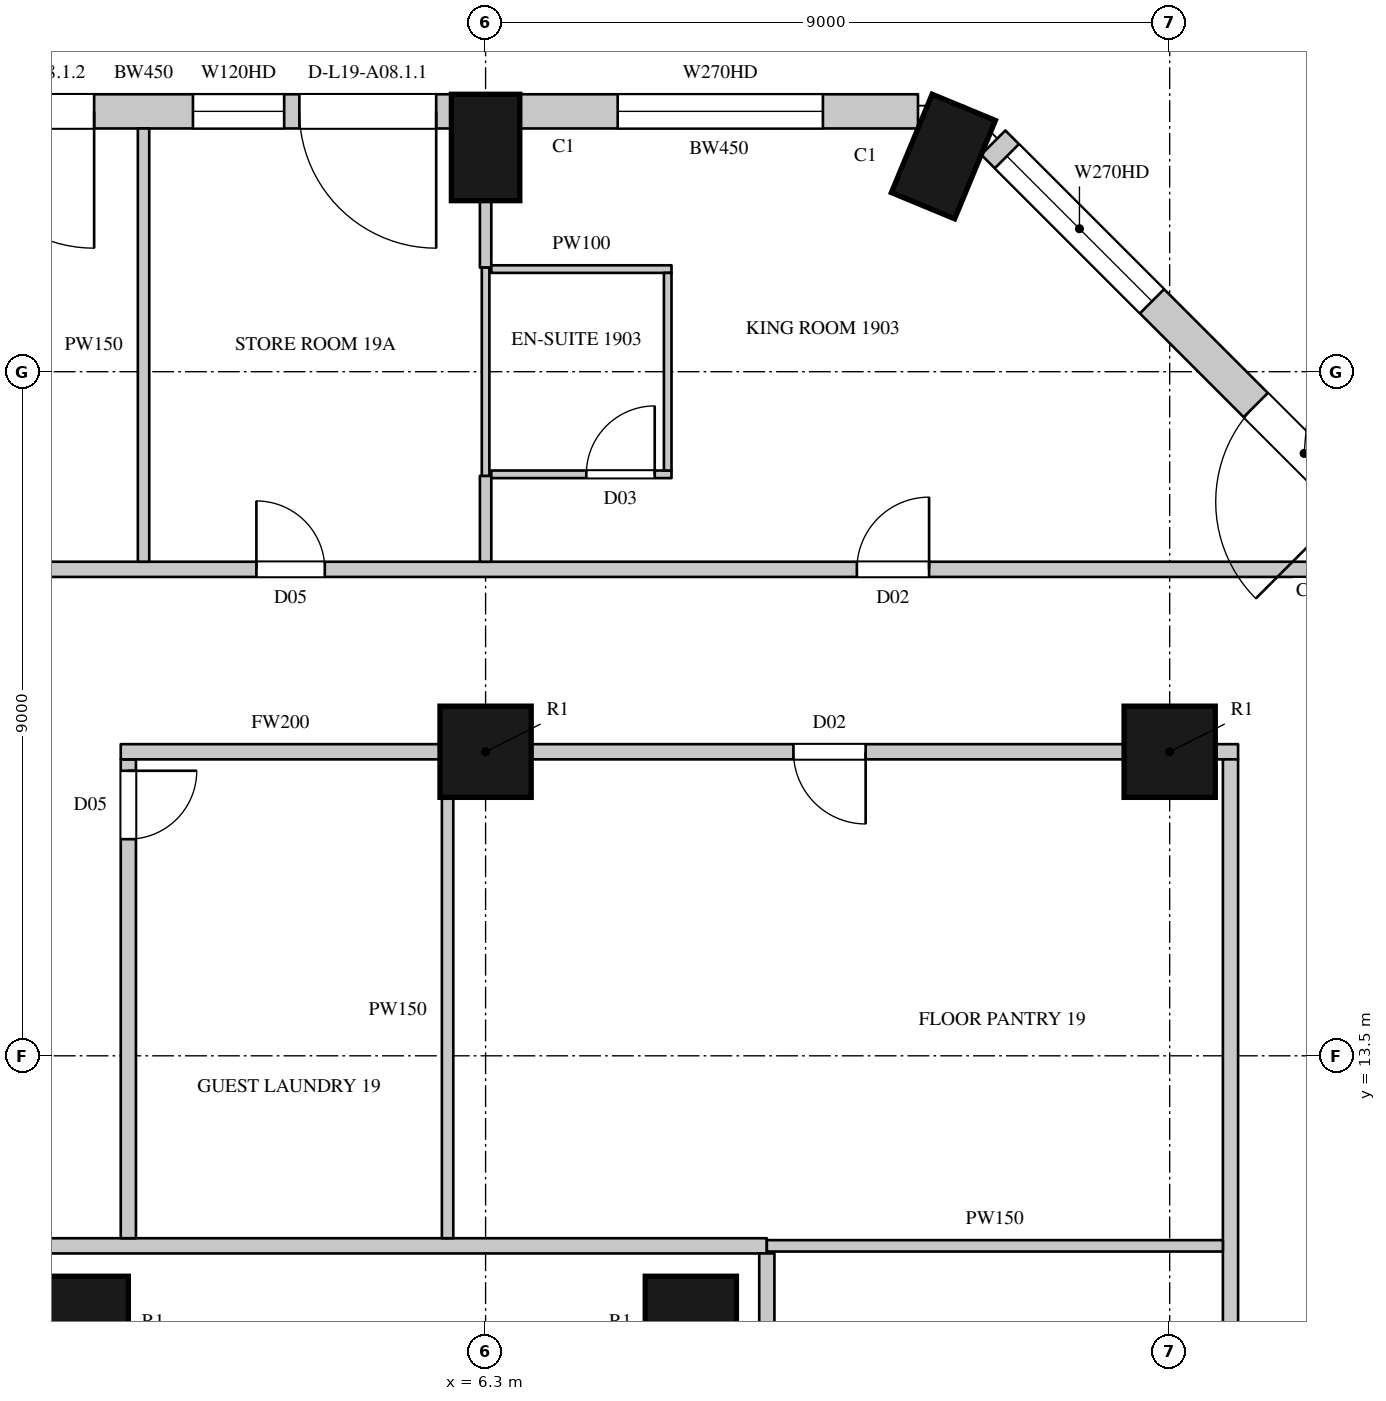
"""IFC4 building model, lengths in metres.
Left out: names, types, materials, properties, quantities, classifications, styles, units other than length and angle.
Written with IfcOpenShell. Run it as: python <this file> out.ifc"""

import sys

from ifc_helpers import new_model, si_unit, direction, frame, frame_2d, origin, origin_2d, place, context, subcontext, project, spatial, rectangle, circle, extrude, element, fill, save


model = new_model("IFC4")
c1 = context("Model", 3, precision=1e-05, world=origin(), true_north=direction((0.0, 1.0)))
c2 = subcontext(c1, "Body", "Model", "MODEL_VIEW")
j1 = project(units=[si_unit("LENGTHUNIT", "METRE"), si_unit("PLANEANGLEUNIT", "RADIAN")], contexts=[c1])
p1 = place(None, origin())
s1 = spatial("IfcSite", under=j1, at=p1, CompositionType="ELEMENT")
p2 = place(p1, origin())
s2 = spatial("IfcBuilding", under=s1, at=p2, CompositionType="ELEMENT")
p3 = place(p2, frame((0.0, 0.0, 98.7)))
s3 = spatial("IfcBuildingStorey", under=s2, at=p3, CompositionType="ELEMENT", Elevation=98.7)
for number, where, z_axis, x_axis in (
    (1, (12.323, 25.331, 0.0), (0.0, 0.0, 1.0), (-0.924, 0.383, 0.0)),
    (2, (6.3, 25.45, 0.0), (0.0, 0.0, 1.0), (-1.0, 0.0, 0.0)),
):
    element("IfcColumn", number, at=place(p3, frame(where, z_axis=z_axis, x_axis=x_axis)), inside=s3, PredefinedType="COLUMN", context=c2, shape_type="SweptSolid", body=[
        extrude(rectangle(XDim=0.9, YDim=1.4, at=origin_2d()), origin(), (0.0, 0.0, 1.0), 3.6),
    ])
for number, where, z_axis, x_axis in (
    (3, (6.3, 17.5, 0.0), (0.0, 0.0, 1.0), (1.0, 0.0, 0.0)),
    (4, (15.3, 17.5, 0.0), (0.0, 0.0, 1.0), (1.0, 0.0, 0.0)),
    (5, (1.0, 10.0, 0.0), (0.0, 0.0, 1.0), (1.0, 0.0, 0.0)),
    (6, (9.0, 10.0, 0.0), (0.0, 0.0, 1.0), (1.0, 0.0, 0.0)),
):
    element("IfcColumn", number, at=place(p3, frame(where, z_axis=z_axis, x_axis=x_axis)), inside=s3, PredefinedType="COLUMN", context=c2, shape_type="SweptSolid", body=[
        extrude(circle(Radius=0.6, at=origin_2d()), origin(), (0.0, 0.0, 1.0), 3.6),
    ])
p4 = place(p3, frame((18.229, 20.265, 0.0), z_axis=(0.0, 0.0, 1.0), x_axis=(-0.707106781187, 0.707106781187, 0.0)))
e7 = element("IfcWall", 7, at=p4, inside=s3, PredefinedType="SOLIDWALL", context=c2, shape_type="SweptSolid", body=[
    extrude(rectangle(XDim=7.424, YDim=0.45, at=frame_2d((3.712, 0.0))), origin(), (0.0, 0.0, 1.0), 3.3),
])
p5 = place(p4, frame((0.74, 0.0, 0.0)))
e8 = element("IfcOpeningElement", 8, at=p5, cuts=e7, PredefinedType="OPENING", context=c2, shape_type="SweptSolid", body=[
    extrude(rectangle(XDim=1.8, YDim=2.4, at=frame_2d((0.9, 1.2))), frame((0.0, 0.235, 0.0), z_axis=(0.0, -1.0, 0.0), x_axis=(1.0, 0.0, 0.0)), (0.0, 0.0, 1.0), 0.47),
])
p6 = place(p4, frame((4.471, 0.0, 1.05)))
e9 = element("IfcOpeningElement", 9, at=p6, cuts=e7, PredefinedType="OPENING", context=c2, shape_type="SweptSolid", body=[
    extrude(rectangle(XDim=2.7, YDim=2.0, at=frame_2d((1.35, 1.0))), frame((0.0, 0.235, 0.0), z_axis=(0.0, -1.0, 0.0), x_axis=(1.0, 0.0, 0.0)), (0.0, 0.0, 1.0), 0.47),
])
p7 = place(p3, frame((11.989, 25.925, 0.0), z_axis=(0.0, 0.0, 1.0), x_axis=(-1.0, 0.0, 0.0)))
e10 = element("IfcWall", 10, at=p7, inside=s3, PredefinedType="SOLIDWALL", context=c2, shape_type="SweptSolid", body=[
    extrude(rectangle(XDim=5.239, YDim=0.45, at=frame_2d((2.619, 0.0))), origin(), (0.0, 0.0, 1.0), 3.3),
])
p8 = place(p7, frame((1.251, 0.0, 1.05)))
e11 = element("IfcOpeningElement", 11, at=p8, cuts=e10, PredefinedType="OPENING", context=c2, shape_type="SweptSolid", body=[
    extrude(rectangle(XDim=2.7, YDim=2.0, at=frame_2d((1.35, 1.0))), frame((0.0, 0.235, 0.0), z_axis=(0.0, -1.0, 0.0), x_axis=(1.0, 0.0, 0.0)), (0.0, 0.0, 1.0), 0.47),
])
p9 = place(p3, frame((5.85, 25.925, 0.0), z_axis=(0.0, 0.0, 1.0), x_axis=(-1.0, 0.0, 0.0)))
e12 = element("IfcWall", 12, at=p9, inside=s3, PredefinedType="SOLIDWALL", context=c2, shape_type="SweptSolid", body=[
    extrude(rectangle(XDim=8.1, YDim=0.45, at=frame_2d((4.05, 0.0))), origin(), (0.0, 0.0, 1.0), 3.3),
])
p10 = place(p9, frame((0.2, 0.0, 0.0)))
e13 = element("IfcOpeningElement", 13, at=p10, cuts=e12, PredefinedType="OPENING", context=c2, shape_type="SweptSolid", body=[
    extrude(rectangle(XDim=1.8, YDim=2.4, at=frame_2d((0.9, 1.2))), frame((0.0, 0.235, 0.0), z_axis=(0.0, -1.0, 0.0), x_axis=(1.0, 0.0, 0.0)), (0.0, 0.0, 1.0), 0.47),
])
p11 = place(p9, frame((2.2, 0.0, 1.05)))
e14 = element("IfcOpeningElement", 14, at=p11, cuts=e12, PredefinedType="OPENING", context=c2, shape_type="SweptSolid", body=[
    extrude(rectangle(XDim=1.2, YDim=2.0, at=frame_2d((0.6, 1.0))), frame((0.0, 0.235, 0.0), z_axis=(0.0, -1.0, 0.0), x_axis=(1.0, 0.0, 0.0)), (0.0, 0.0, 1.0), 0.47),
])
p12 = place(p9, frame((4.7, 0.0, 0.0)))
e15 = element("IfcOpeningElement", 15, at=p12, cuts=e12, PredefinedType="OPENING", context=c2, shape_type="SweptSolid", body=[
    extrude(rectangle(XDim=1.8, YDim=2.4, at=frame_2d((0.9, 1.2))), frame((0.0, 0.235, 0.0), z_axis=(0.0, -1.0, 0.0), x_axis=(1.0, 0.0, 0.0)), (0.0, 0.0, 1.0), 0.47),
])
p13 = place(p9, frame((6.7, 0.0, 1.05)))
e16 = element("IfcOpeningElement", 16, at=p13, cuts=e12, PredefinedType="OPENING", context=c2, shape_type="SweptSolid", body=[
    extrude(rectangle(XDim=1.2, YDim=2.0, at=frame_2d((0.6, 1.0))), frame((0.0, 0.235, 0.0), z_axis=(0.0, -1.0, 0.0), x_axis=(1.0, 0.0, 0.0)), (0.0, 0.0, 1.0), 0.47),
])
p14 = place(p3, frame((16.486, 23.529, 0.0), z_axis=(0.0, 0.0, 1.0), x_axis=(-0.707022305137, 0.707191247145, 0.0)))
e17 = element("IfcWall", 17, at=p14, inside=s3, PredefinedType="SOLIDWALL", context=c2, shape_type="SweptSolid", body=[
    extrude(rectangle(XDim=1.445, YDim=0.45, at=frame_2d((0.723, 0.0))), origin(), (0.0, 0.0, 1.0), 0.6),
])
p15 = place(p3, frame((-23.765, 19.9, 0.0), z_axis=(0.0, 0.0, 1.0), x_axis=(1.0, 0.0, 0.0)))
e18 = element("IfcWall", 18, at=p15, inside=s3, PredefinedType="PARTITIONING", context=c2, shape_type="SweptSolid", body=[
    extrude(rectangle(XDim=41.549, YDim=0.2, at=frame_2d((20.774, 0.0))), origin(), (0.0, 0.0, 1.0), 3.3),
])
p16 = place(p15, frame((14.2, 0.0, 0.0)))
e19 = element("IfcOpeningElement", 19, at=p16, cuts=e18, PredefinedType="OPENING", context=c2, shape_type="SweptSolid", body=[
    extrude(rectangle(XDim=0.9, YDim=2.2, at=frame_2d((0.45, 1.1))), frame((0.0, 0.11, 0.0), z_axis=(0.0, -1.0, 0.0), x_axis=(1.0, 0.0, 0.0)), (0.0, 0.0, 1.0), 0.22),
])
p17 = place(p15, frame((27.05, 0.0, 0.0)))
e20 = element("IfcOpeningElement", 20, at=p17, cuts=e18, PredefinedType="OPENING", context=c2, shape_type="SweptSolid", body=[
    extrude(rectangle(XDim=0.9, YDim=2.2, at=frame_2d((0.45, 1.1))), frame((0.0, 0.11, 0.0), z_axis=(0.0, -1.0, 0.0), x_axis=(1.0, 0.0, 0.0)), (0.0, 0.0, 1.0), 0.22),
])
p18 = place(p15, frame((0.75, 0.0, 0.0)))
e21 = element("IfcOpeningElement", 21, at=p18, cuts=e18, PredefinedType="OPENING", context=c2, shape_type="SweptSolid", body=[
    extrude(rectangle(XDim=1.1, YDim=2.4, at=frame_2d((0.55, 1.2))), frame((0.0, 0.11, 0.0), z_axis=(0.0, -1.0, 0.0), x_axis=(1.0, 0.0, 0.0)), (0.0, 0.0, 1.0), 0.22),
])
p19 = place(p15, frame((23.15, 0.0, 0.0)))
e22 = element("IfcOpeningElement", 22, at=p19, cuts=e18, PredefinedType="OPENING", context=c2, shape_type="SweptSolid", body=[
    extrude(rectangle(XDim=0.95, YDim=2.2, at=frame_2d((0.475, 1.1))), frame((0.0, 0.11, 0.0), z_axis=(0.0, -1.0, 0.0), x_axis=(1.0, 0.0, 0.0)), (0.0, 0.0, 1.0), 0.22),
])
p20 = place(p15, frame((34.95, 0.0, 0.0)))
e23 = element("IfcOpeningElement", 23, at=p20, cuts=e18, PredefinedType="OPENING", context=c2, shape_type="SweptSolid", body=[
    extrude(rectangle(XDim=0.95, YDim=2.2, at=frame_2d((0.475, 1.1))), frame((0.0, 0.11, 0.0), z_axis=(0.0, -1.0, 0.0), x_axis=(1.0, 0.0, 0.0)), (0.0, 0.0, 1.0), 0.22),
])
p21 = place(p3, frame((-7.9, 11.0, 0.0), z_axis=(0.0, 0.0, 1.0), x_axis=(1.0, 0.0, 0.0)))
e24 = element("IfcWall", 24, at=p21, inside=s3, PredefinedType="PARTITIONING", context=c2, shape_type="SweptSolid", body=[
    extrude(rectangle(XDim=17.9, YDim=0.2, at=frame_2d((8.95, 0.0))), origin(), (0.0, 0.0, 1.0), 3.3),
])
p22 = place(p21, frame((6.5, 0.0, 0.0)))
e25 = element("IfcOpeningElement", 25, at=p22, cuts=e24, PredefinedType="OPENING", context=c2, shape_type="SweptSolid", body=[
    extrude(rectangle(XDim=1.5, YDim=2.2, at=frame_2d((0.75, 1.1))), frame((0.0, 0.11, 0.0), z_axis=(0.0, -1.0, 0.0), x_axis=(1.0, 0.0, 0.0)), (0.0, 0.0, 1.0), 0.22),
])
p23 = place(p3, frame((1.6, 11.1, 0.0), z_axis=(0.0, 0.0, 1.0), x_axis=(0.0, 1.0, 0.0)))
e26 = element("IfcWall", 26, at=p23, inside=s3, PredefinedType="PARTITIONING", context=c2, shape_type="SweptSolid", body=[
    extrude(rectangle(XDim=6.3, YDim=0.2, at=frame_2d((3.15, 0.0))), origin(), (0.0, 0.0, 1.0), 3.3),
])
p24 = place(p23, frame((5.25, 0.0, 0.0)))
e27 = element("IfcOpeningElement", 27, at=p24, cuts=e26, PredefinedType="OPENING", context=c2, shape_type="SweptSolid", body=[
    extrude(rectangle(XDim=0.9, YDim=2.2, at=frame_2d((0.45, 1.1))), frame((0.0, 0.11, 0.0), z_axis=(0.0, -1.0, 0.0), x_axis=(1.0, 0.0, 0.0)), (0.0, 0.0, 1.0), 0.22),
])
p25 = place(p3, frame((1.5, 17.5, 0.0), z_axis=(0.0, 0.0, 1.0), x_axis=(1.0, 0.0, 0.0)))
e28 = element("IfcWall", 28, at=p25, inside=s3, PredefinedType="PARTITIONING", context=c2, shape_type="SweptSolid", body=[
    extrude(rectangle(XDim=4.2, YDim=0.2, at=frame_2d((2.1, 0.0))), origin(), (0.0, 0.0, 1.0), 2.75),
])
p26 = place(p3, frame((6.9, 17.5, 0.0), z_axis=(0.0, 0.0, 1.0), x_axis=(1.0, 0.0, 0.0)))
e29 = element("IfcWall", 29, at=p26, inside=s3, PredefinedType="PARTITIONING", context=c2, shape_type="SweptSolid", body=[
    extrude(rectangle(XDim=7.8, YDim=0.2, at=frame_2d((3.9, 0.0))), origin(), (0.0, 0.0, 1.0), 2.75),
])
p27 = place(p26, frame((3.45, 0.0, 0.0)))
e30 = element("IfcOpeningElement", 30, at=p27, cuts=e29, PredefinedType="OPENING", context=c2, shape_type="SweptSolid", body=[
    extrude(rectangle(XDim=0.95, YDim=2.2, at=frame_2d((0.475, 1.1))), frame((0.0, 0.11, 0.0), z_axis=(0.0, -1.0, 0.0), x_axis=(1.0, 0.0, 0.0)), (0.0, 0.0, 1.0), 0.22),
])
p28 = place(p3, frame((15.9, 17.5, 0.0), z_axis=(0.0, 0.0, 1.0), x_axis=(1.0, 0.0, 0.0)))
e31 = element("IfcWall", 31, at=p28, inside=s3, PredefinedType="PARTITIONING", context=c2, shape_type="SweptSolid", body=[
    extrude(rectangle(XDim=0.3, YDim=0.2, at=frame_2d((0.15, 0.0))), origin(), (0.0, 0.0, 1.0), 3.3),
])
p29 = place(p3, frame((10.0, -10.9, 0.0), z_axis=(0.0, 0.0, 1.0), x_axis=(0.0, 1.0, 0.0)))
e32 = element("IfcWall", 32, at=p29, inside=s3, PredefinedType="PARTITIONING", context=c2, shape_type="SweptSolid", body=[
    extrude(rectangle(XDim=21.8, YDim=0.2, at=frame_2d((10.9, 0.0))), origin(), (0.0, 0.0, 1.0), 3.3),
])
p30 = place(p29, frame((15.9, 0.0, 0.0)))
e33 = element("IfcOpeningElement", 33, at=p30, cuts=e32, PredefinedType="OPENING", context=c2, shape_type="SweptSolid", body=[
    extrude(rectangle(XDim=1.5, YDim=2.2, at=frame_2d((0.75, 1.1))), frame((0.0, 0.11, 0.0), z_axis=(0.0, -1.0, 0.0), x_axis=(1.0, 0.0, 0.0)), (0.0, 0.0, 1.0), 0.22),
])
p31 = place(p29, frame((11.55, 0.0, 0.0)))
e34 = element("IfcOpeningElement", 34, at=p31, cuts=e32, PredefinedType="OPENING", context=c2, shape_type="SweptSolid", body=[
    extrude(rectangle(XDim=1.5, YDim=2.2, at=frame_2d((0.75, 1.1))), frame((0.0, 0.11, 0.0), z_axis=(0.0, -1.0, 0.0), x_axis=(1.0, 0.0, 0.0)), (0.0, 0.0, 1.0), 0.22),
])
p32 = place(p3, frame((16.1, 6.825, 0.0), z_axis=(0.0, 0.0, 1.0), x_axis=(0.0, 1.0, 0.0)))
e35 = element("IfcWall", 35, at=p32, inside=s3, PredefinedType="PARTITIONING", context=c2, shape_type="SweptSolid", body=[
    extrude(rectangle(XDim=10.575, YDim=0.2, at=frame_2d((5.288, 0.0))), origin(), (0.0, 0.0, 1.0), 3.3),
])
p33 = place(p3, frame((1.8, 20.0, 0.0), z_axis=(0.0, 0.0, 1.0), x_axis=(0.0, 1.0, 0.0)))
e36 = element("IfcWall", 36, at=p33, inside=s3, PredefinedType="PARTITIONING", context=c2, shape_type="SweptSolid", body=[
    extrude(rectangle(XDim=5.7, YDim=0.15, at=frame_2d((2.85, 0.0))), origin(), (0.0, 0.0, 1.0), 2.65),
])
p34 = place(p3, frame((5.8, 11.1, 0.0), z_axis=(0.0, 0.0, 1.0), x_axis=(0.0, 1.0, 0.0)))
e37 = element("IfcWall", 37, at=p34, inside=s3, PredefinedType="PARTITIONING", context=c2, shape_type="SweptSolid", body=[
    extrude(rectangle(XDim=5.989, YDim=0.15, at=frame_2d((2.994, 0.0))), origin(), (0.0, 0.0, 1.0), 3.3),
])
p35 = place(p3, frame((6.3, 20.0, 0.0), z_axis=(0.0, 0.0, 1.0), x_axis=(0.0, 1.0, 0.0)))
e38 = element("IfcWall", 38, at=p35, inside=s3, PredefinedType="PARTITIONING", context=c2, shape_type="SweptSolid", body=[
    extrude(rectangle(XDim=1.13, YDim=0.15, at=frame_2d((0.565, 0.0))), origin(), (0.0, 0.0, 1.0), 2.75),
])
p36 = place(p3, frame((6.3, 23.87, 0.0), z_axis=(0.0, 0.0, 1.0), x_axis=(0.0, 1.0, 0.0)))
e39 = element("IfcWall", 39, at=p36, inside=s3, PredefinedType="PARTITIONING", context=c2, shape_type="SweptSolid", body=[
    extrude(rectangle(XDim=0.88, YDim=0.15, at=frame_2d((0.44, 0.0))), origin(), (0.0, 0.0, 1.0), 2.75),
])
p37 = place(p3, frame((10.0, 11.0, 0.0), z_axis=(0.0, 0.0, 1.0), x_axis=(1.0, 0.0, 0.0)))
e40 = element("IfcWall", 40, at=p37, inside=s3, PredefinedType="PARTITIONING", context=c2, shape_type="SweptSolid", body=[
    extrude(rectangle(XDim=6.0, YDim=0.15, at=frame_2d((3.0, 0.0))), origin(), (0.0, 0.0, 1.0), 3.3),
])
p38 = place(p3, frame((6.3, 21.13, 0.0), z_axis=(0.0, 0.0, 1.0), x_axis=(0.0, 1.0, 0.0)))
e41 = element("IfcWall", 41, at=p38, inside=s3, PredefinedType="PARTITIONING", context=c2, shape_type="SweptSolid", body=[
    extrude(rectangle(XDim=2.74, YDim=0.1, at=frame_2d((1.37, 0.0))), origin(), (0.0, 0.0, 1.0), 2.75),
])
p39 = place(p3, frame((6.375, 21.15, 0.0), z_axis=(0.0, 0.0, 1.0), x_axis=(1.0, 0.0, 0.0)))
e42 = element("IfcWall", 42, at=p39, inside=s3, PredefinedType="PARTITIONING", context=c2, shape_type="SweptSolid", body=[
    extrude(rectangle(XDim=2.371, YDim=0.1, at=frame_2d((1.186, 0.0))), origin(), (0.0, 0.0, 1.0), 3.3),
])
p40 = place(p39, frame((1.25, 0.0, 0.0)))
e43 = element("IfcOpeningElement", 43, at=p40, cuts=e42, PredefinedType="OPENING", context=c2, shape_type="SweptSolid", body=[
    extrude(rectangle(XDim=0.9, YDim=2.2, at=frame_2d((0.45, 1.1))), frame((0.0, 0.06, 0.0), z_axis=(0.0, -1.0, 0.0), x_axis=(1.0, 0.0, 0.0)), (0.0, 0.0, 1.0), 0.12),
])
p41 = place(p3, frame((6.375, 23.85, 0.0), z_axis=(0.0, 0.0, 1.0), x_axis=(1.0, 0.0, 0.0)))
e44 = element("IfcWall", 44, at=p41, inside=s3, PredefinedType="PARTITIONING", context=c2, shape_type="SweptSolid", body=[
    extrude(rectangle(XDim=2.371, YDim=0.1, at=frame_2d((1.186, 0.0))), origin(), (0.0, 0.0, 1.0), 3.3),
])
p42 = place(p3, frame((8.696, 21.2, 0.0), z_axis=(0.0, 0.0, 1.0), x_axis=(0.0, 1.0, 0.0)))
e45 = element("IfcWall", 45, at=p42, inside=s3, PredefinedType="PARTITIONING", context=c2, shape_type="SweptSolid", body=[
    extrude(rectangle(XDim=2.6, YDim=0.1, at=frame_2d((1.3, 0.0))), origin(), (0.0, 0.0, 1.0), 3.3),
])
p43 = place(p5, origin())
e46 = element("IfcDoor", 46, at=p43, inside=s3, OperationType="SLIDING_TO_LEFT", PredefinedType="DOOR", context=c2, shape_type="SweptSolid", body=[
    extrude(rectangle(XDim=1.8, YDim=2.4, at=frame_2d((0.9, 1.2))), frame((0.0, 0.13, 0.0), z_axis=(0.0, -1.0, 0.0), x_axis=(1.0, 0.0, 0.0)), (0.0, 0.0, 1.0), 0.05),
])
fill(e8, e46)
p44 = place(p6, origin())
e47 = element("IfcWindow", 47, at=p44, inside=s3, PartitioningType="SINGLE_PANEL", PredefinedType="WINDOW", context=c2, shape_type="SweptSolid", body=[
    extrude(rectangle(XDim=2.7, YDim=2.0, at=frame_2d((1.35, 1.0))), frame((0.0, 0.135, 0.0), z_axis=(0.0, -1.0, 0.0), x_axis=(1.0, 0.0, 0.0)), (0.0, 0.0, 1.0), 0.06),
])
fill(e9, e47)
p45 = place(p8, origin())
e48 = element("IfcWindow", 48, at=p45, inside=s3, PartitioningType="SINGLE_PANEL", PredefinedType="WINDOW", context=c2, shape_type="SweptSolid", body=[
    extrude(rectangle(XDim=2.7, YDim=2.0, at=frame_2d((1.35, 1.0))), frame((0.0, 0.135, 0.0), z_axis=(0.0, -1.0, 0.0), x_axis=(1.0, 0.0, 0.0)), (0.0, 0.0, 1.0), 0.06),
])
fill(e11, e48)
p46 = place(p10, origin())
e49 = element("IfcDoor", 49, at=p46, inside=s3, OperationType="SLIDING_TO_LEFT", PredefinedType="DOOR", context=c2, shape_type="SweptSolid", body=[
    extrude(rectangle(XDim=1.8, YDim=2.4, at=frame_2d((0.9, 1.2))), frame((0.0, 0.13, 0.0), z_axis=(0.0, -1.0, 0.0), x_axis=(1.0, 0.0, 0.0)), (0.0, 0.0, 1.0), 0.05),
])
fill(e13, e49)
p47 = place(p11, origin())
e50 = element("IfcWindow", 50, at=p47, inside=s3, PartitioningType="SINGLE_PANEL", PredefinedType="WINDOW", context=c2, shape_type="SweptSolid", body=[
    extrude(rectangle(XDim=1.2, YDim=2.0, at=frame_2d((0.6, 1.0))), frame((0.0, 0.135, 0.0), z_axis=(0.0, -1.0, 0.0), x_axis=(1.0, 0.0, 0.0)), (0.0, 0.0, 1.0), 0.06),
])
fill(e14, e50)
p48 = place(p12, origin())
e51 = element("IfcDoor", 51, at=p48, inside=s3, OperationType="SLIDING_TO_LEFT", PredefinedType="DOOR", context=c2, shape_type="SweptSolid", body=[
    extrude(rectangle(XDim=1.8, YDim=2.4, at=frame_2d((0.9, 1.2))), frame((0.0, 0.13, 0.0), z_axis=(0.0, -1.0, 0.0), x_axis=(1.0, 0.0, 0.0)), (0.0, 0.0, 1.0), 0.05),
])
fill(e15, e51)
p49 = place(p24, origin())
e52 = element("IfcDoor", 52, at=p49, inside=s3, OperationType="SINGLE_SWING_LEFT", PredefinedType="DOOR", context=c2, shape_type="SweptSolid", body=[
    extrude(rectangle(XDim=0.9, YDim=2.2, at=frame_2d((0.45, 1.1))), frame((0.0, 0.025, 0.0), z_axis=(0.0, -1.0, 0.0), x_axis=(1.0, 0.0, 0.0)), (0.0, 0.0, 1.0), 0.05),
])
fill(e27, e52)
p50 = place(p27, origin())
e53 = element("IfcDoor", 53, at=p50, inside=s3, OperationType="SINGLE_SWING_LEFT", PredefinedType="DOOR", context=c2, shape_type="SweptSolid", body=[
    extrude(rectangle(XDim=0.95, YDim=2.2, at=frame_2d((0.475, 1.1))), frame((0.0, 0.025, 0.0), z_axis=(0.0, -1.0, 0.0), x_axis=(1.0, 0.0, 0.0)), (0.0, 0.0, 1.0), 0.05),
])
fill(e30, e53)
p51 = place(p17, origin())
e54 = element("IfcDoor", 54, at=p51, inside=s3, OperationType="SINGLE_SWING_LEFT", PredefinedType="DOOR", context=c2, shape_type="SweptSolid", body=[
    extrude(rectangle(XDim=0.9, YDim=2.2, at=frame_2d((0.45, 1.1))), frame((0.0, 0.025, 0.0), z_axis=(0.0, -1.0, 0.0), x_axis=(1.0, 0.0, 0.0)), (0.0, 0.0, 1.0), 0.05),
])
fill(e20, e54)
p52 = place(p20, origin())
e55 = element("IfcDoor", 55, at=p52, inside=s3, OperationType="SINGLE_SWING_RIGHT", PredefinedType="DOOR", context=c2, shape_type="SweptSolid", body=[
    extrude(rectangle(XDim=0.95, YDim=2.2, at=frame_2d((0.475, 1.1))), frame((0.0, 0.025, 0.0), z_axis=(0.0, -1.0, 0.0), x_axis=(1.0, 0.0, 0.0)), (0.0, 0.0, 1.0), 0.05),
])
fill(e23, e55)
p53 = place(p40, origin())
e56 = element("IfcDoor", 56, at=p53, inside=s3, OperationType="SINGLE_SWING_RIGHT", PredefinedType="DOOR", context=c2, shape_type="SweptSolid", body=[
    extrude(rectangle(XDim=0.9, YDim=2.2, at=frame_2d((0.45, 1.1))), frame((0.0, 0.025, 0.0), z_axis=(0.0, -1.0, 0.0), x_axis=(1.0, 0.0, 0.0)), (0.0, 0.0, 1.0), 0.05),
])
fill(e43, e56)
save(model, sys.argv[1])
